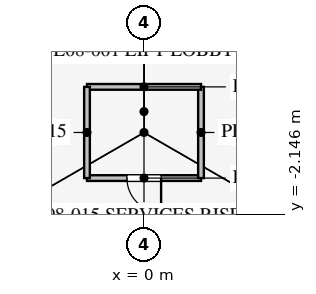
"""IFC4 building model, lengths in metres.
Left out: names, types, materials, properties, quantities, classifications, styles, units other than length and angle.
Written with IfcOpenShell. Run it as: python <this file> out.ifc"""

import sys

from ifc_helpers import new_model, si_unit, direction, frame, frame_2d, origin, place, context, subcontext, project, spatial, rectangle, extrude, element, fill, save


model = new_model("IFC4")
c1 = context("Model", 3, precision=1e-05, world=origin(), true_north=direction((0.0, 1.0)))
c2 = subcontext(c1, "Body", "Model", "MODEL_VIEW")
j1 = project(units=[si_unit("LENGTHUNIT", "METRE"), si_unit("PLANEANGLEUNIT", "RADIAN")], contexts=[c1])
p1 = place(None, origin())
s1 = spatial("IfcSite", under=j1, at=p1, CompositionType="ELEMENT")
p2 = place(p1, origin())
s2 = spatial("IfcBuilding", under=s1, at=p2, CompositionType="ELEMENT")
p3 = place(p2, frame((0.0, 0.0, 37.5)))
s3 = spatial("IfcBuildingStorey", under=s2, at=p3, CompositionType="ELEMENT", Elevation=37.5)
p4 = place(p3, frame((-1.5, -1.2, 0.0), z_axis=(0.0, 0.0, 1.0), x_axis=(1.0, 0.0, 0.0)))
e1 = element("IfcWall", 1, at=p4, inside=s3, PredefinedType="PARTITIONING", context=c2, shape_type="SweptSolid", body=[
    extrude(rectangle(XDim=3.0, YDim=0.15, at=frame_2d((1.5, 0.0))), origin(), (0.0, 0.0, 1.0), 4.0),
])
p5 = place(p4, frame((1.05, 0.0, 0.0)))
e2 = element("IfcOpeningElement", 2, at=p5, cuts=e1, PredefinedType="OPENING", context=c2, shape_type="SweptSolid", body=[
    extrude(rectangle(XDim=0.9, YDim=2.1, at=frame_2d((0.45, 1.05))), frame((0.0, 0.085, 0.0), z_axis=(0.0, -1.0, 0.0), x_axis=(1.0, 0.0, 0.0)), (0.0, 0.0, 1.0), 0.17),
])
p6 = place(p3, frame((1.5, -1.2, 0.0), z_axis=(0.0, 0.0, 1.0), x_axis=(0.0, 1.0, 0.0)))
e3 = element("IfcWall", 3, at=p6, inside=s3, PredefinedType="PARTITIONING", context=c2, shape_type="SweptSolid", body=[
    extrude(rectangle(XDim=2.4, YDim=0.15, at=frame_2d((1.2, 0.0))), origin(), (0.0, 0.0, 1.0), 4.0),
])
p7 = place(p3, frame((1.5, 1.2, 0.0), z_axis=(0.0, 0.0, 1.0), x_axis=(-1.0, 0.0, 0.0)))
e4 = element("IfcWall", 4, at=p7, inside=s3, PredefinedType="PARTITIONING", context=c2, shape_type="SweptSolid", body=[
    extrude(rectangle(XDim=3.0, YDim=0.15, at=frame_2d((1.5, 0.0))), origin(), (0.0, 0.0, 1.0), 4.0),
])
p8 = place(p3, frame((-1.5, 1.2, 0.0), z_axis=(0.0, 0.0, 1.0), x_axis=(0.0, -1.0, 0.0)))
e5 = element("IfcWall", 5, at=p8, inside=s3, PredefinedType="PARTITIONING", context=c2, shape_type="SweptSolid", body=[
    extrude(rectangle(XDim=2.4, YDim=0.15, at=frame_2d((1.2, 0.0))), origin(), (0.0, 0.0, 1.0), 4.0),
])
p9 = place(p5, frame((0.9, 0.0, 0.0), z_axis=(0.0, 0.0, 1.0), x_axis=(-1.0, 0.0, 0.0)))
e6 = element("IfcDoor", 6, at=p9, inside=s3, OperationType="SINGLE_SWING_LEFT", PredefinedType="DOOR", context=c2, shape_type="SweptSolid", body=[
    extrude(rectangle(XDim=0.9, YDim=2.1, at=frame_2d((0.45, 1.05))), frame((0.0, 0.025, 0.0), z_axis=(0.0, -1.0, 0.0), x_axis=(1.0, 0.0, 0.0)), (0.0, 0.0, 1.0), 0.05),
])
fill(e2, e6)
save(model, sys.argv[1])
